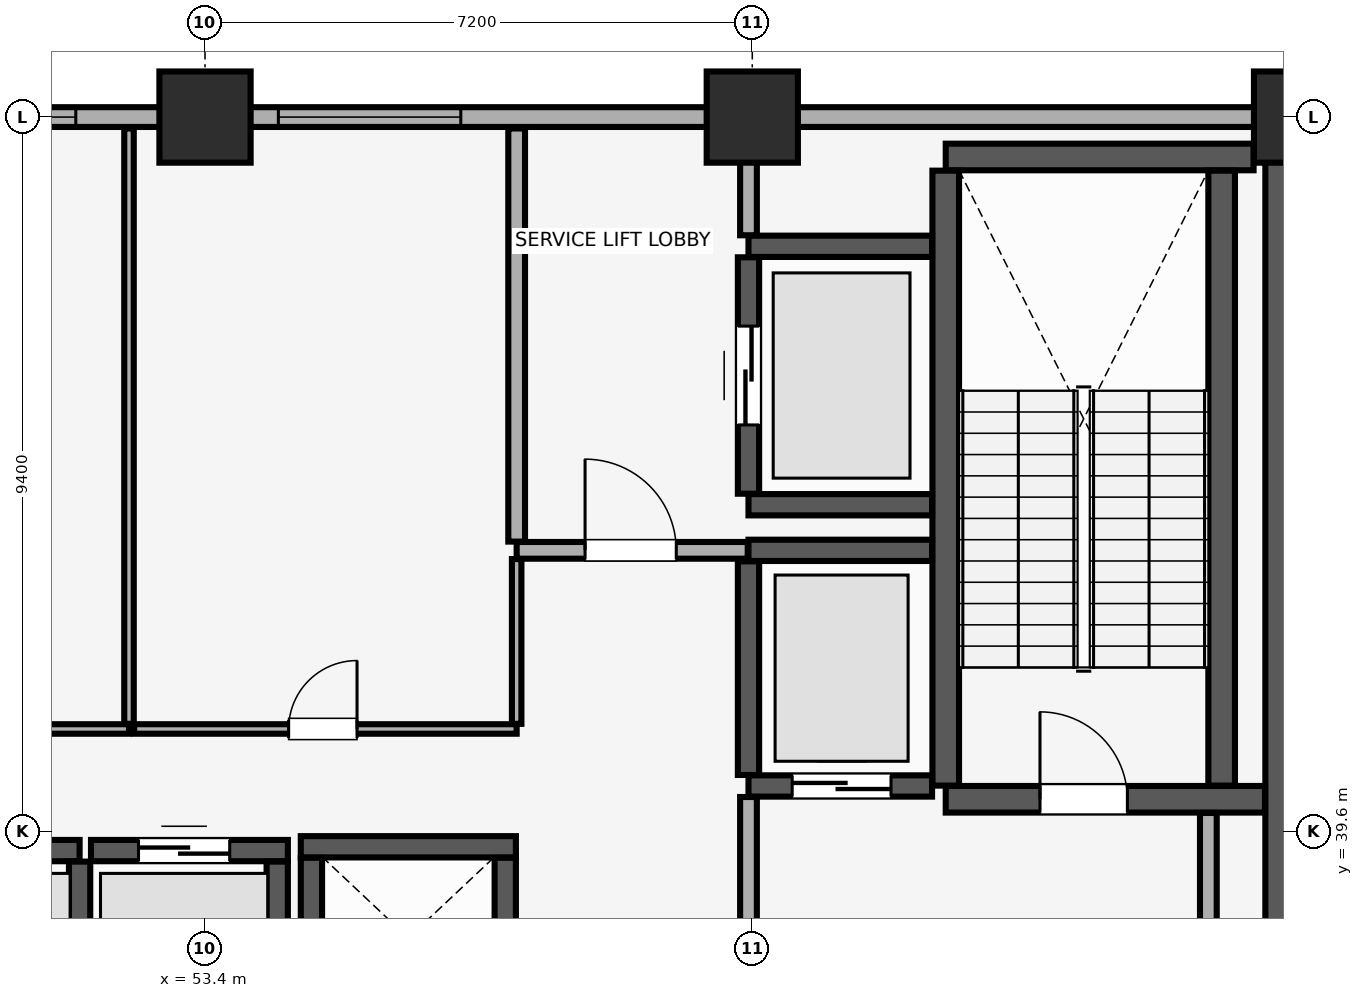
"""IFC4 building model, lengths in metres.
Left out: names, types, materials, properties, quantities, classifications, styles, units other than length and angle.
Written with IfcOpenShell. Run it as: python <this file> out.ifc"""

import sys

from ifc_helpers import new_model, si_unit, direction, frame, frame_2d, origin, origin_2d, place, context, subcontext, project, spatial, rectangle, extrude, element, fill, save


model = new_model("IFC4")
c1 = context("Model", 3, precision=1e-05, world=origin(), true_north=direction((0.0, 1.0)))
c2 = subcontext(c1, "Body", "Model", "MODEL_VIEW")
j1 = project(units=[si_unit("LENGTHUNIT", "METRE"), si_unit("PLANEANGLEUNIT", "RADIAN")], contexts=[c1])
p1 = place(None, origin())
s1 = spatial("IfcSite", under=j1, at=p1, CompositionType="ELEMENT")
p2 = place(p1, origin())
s2 = spatial("IfcBuilding", under=s1, at=p2, CompositionType="ELEMENT")
p3 = place(p2, frame((0.0, 0.0, 130.55)))
s3 = spatial("IfcBuildingStorey", under=s2, at=p3, CompositionType="ELEMENT", Elevation=130.55)
for number, where, z_axis, x_axis in (
    (1, (53.4, 49.0, 0.0), (0.0, 0.0, 1.0), (1.0, 0.0, 0.0)),
    (2, (60.6, 49.0, 0.0), (0.0, 0.0, 1.0), (1.0, 0.0, 0.0)),
    (3, (67.8, 49.0, 0.0), (0.0, 0.0, 1.0), (1.0, 0.0, 0.0)),
):
    element("IfcColumn", number, at=place(p3, frame(where, z_axis=z_axis, x_axis=x_axis)), inside=s3, PredefinedType="COLUMN", context=c2, shape_type="SweptSolid", body=[
        extrude(rectangle(XDim=1.2, YDim=1.2, at=origin_2d()), origin(), (0.0, 0.0, 1.0), 4.56),
    ])
p4 = place(p3, frame((79.8, 49.0, 0.0), z_axis=(0.0, 0.0, 1.0), x_axis=(-1.0, 0.0, 0.0)))
e4 = element("IfcWall", 4, at=p4, inside=s3, PredefinedType="SOLIDWALL", context=c2, shape_type="SweptSolid", body=[
    extrude(rectangle(XDim=75.6, YDim=0.26, at=frame_2d((37.8, 0.0))), origin(), (0.0, 0.0, 1.0), 3.4),
])
p5 = place(p4, frame((71.815, 0.0, 0.85)))
e5 = element("IfcOpeningElement", 5, at=p5, cuts=e4, PredefinedType="OPENING", context=c2, shape_type="SweptSolid", body=[
    extrude(rectangle(XDim=3.0, YDim=1.5, at=frame_2d((1.5, 0.75))), frame((0.0, 0.14, 0.0), z_axis=(0.0, -1.0, 0.0), x_axis=(1.0, 0.0, 0.0)), (0.0, 0.0, 1.0), 0.28),
])
p6 = place(p4, frame((65.775, 0.0, 0.85)))
e6 = element("IfcOpeningElement", 6, at=p6, cuts=e4, PredefinedType="OPENING", context=c2, shape_type="SweptSolid", body=[
    extrude(rectangle(XDim=3.0, YDim=1.5, at=frame_2d((1.5, 0.75))), frame((0.0, 0.14, 0.0), z_axis=(0.0, -1.0, 0.0), x_axis=(1.0, 0.0, 0.0)), (0.0, 0.0, 1.0), 0.28),
])
p7 = place(p4, frame((6.825, 0.0, 0.85)))
e7 = element("IfcOpeningElement", 7, at=p7, cuts=e4, PredefinedType="OPENING", context=c2, shape_type="SweptSolid", body=[
    extrude(rectangle(XDim=3.0, YDim=1.5, at=frame_2d((1.5, 0.75))), frame((0.0, 0.14, 0.0), z_axis=(0.0, -1.0, 0.0), x_axis=(1.0, 0.0, 0.0)), (0.0, 0.0, 1.0), 0.28),
])
p8 = place(p4, frame((0.785, 0.0, 0.85)))
e8 = element("IfcOpeningElement", 8, at=p8, cuts=e4, PredefinedType="OPENING", context=c2, shape_type="SweptSolid", body=[
    extrude(rectangle(XDim=3.0, YDim=1.5, at=frame_2d((1.5, 0.75))), frame((0.0, 0.14, 0.0), z_axis=(0.0, -1.0, 0.0), x_axis=(1.0, 0.0, 0.0)), (0.0, 0.0, 1.0), 0.28),
])
p9 = place(p4, frame((50.315, 0.0, 0.9)))
e9 = element("IfcOpeningElement", 9, at=p9, cuts=e4, PredefinedType="OPENING", context=c2, shape_type="SweptSolid", body=[
    extrude(rectangle(XDim=3.6, YDim=1.5, at=frame_2d((1.8, 0.75))), frame((0.0, 0.14, 0.0), z_axis=(0.0, -1.0, 0.0), x_axis=(1.0, 0.0, 0.0)), (0.0, 0.0, 1.0), 0.28),
])
p10 = place(p4, frame((45.25, 0.0, 0.9)))
e10 = element("IfcOpeningElement", 10, at=p10, cuts=e4, PredefinedType="OPENING", context=c2, shape_type="SweptSolid", body=[
    extrude(rectangle(XDim=3.0, YDim=1.5, at=frame_2d((1.5, 0.75))), frame((0.0, 0.14, 0.0), z_axis=(0.0, -1.0, 0.0), x_axis=(1.0, 0.0, 0.0)), (0.0, 0.0, 1.0), 0.28),
])
p11 = place(p4, frame((28.1, 0.0, 0.9)))
e11 = element("IfcOpeningElement", 11, at=p11, cuts=e4, PredefinedType="OPENING", context=c2, shape_type="SweptSolid", body=[
    extrude(rectangle(XDim=3.6, YDim=1.5, at=frame_2d((1.8, 0.75))), frame((0.0, 0.14, 0.0), z_axis=(0.0, -1.0, 0.0), x_axis=(1.0, 0.0, 0.0)), (0.0, 0.0, 1.0), 0.28),
])
p12 = place(p4, frame((23.035, 0.0, 0.9)))
e12 = element("IfcOpeningElement", 12, at=p12, cuts=e4, PredefinedType="OPENING", context=c2, shape_type="SweptSolid", body=[
    extrude(rectangle(XDim=2.4, YDim=1.5, at=frame_2d((1.2, 0.75))), frame((0.0, 0.14, 0.0), z_axis=(0.0, -1.0, 0.0), x_axis=(1.0, 0.0, 0.0)), (0.0, 0.0, 1.0), 0.28),
])
p13 = place(p3, frame((67.8, 29.4, 0.0), z_axis=(0.0, 0.0, 1.0), x_axis=(0.0, 1.0, 0.0)))
e13 = element("IfcWall", 13, at=p13, inside=s3, PredefinedType="SHEAR", context=c2, shape_type="SweptSolid", body=[
    extrude(rectangle(XDim=19.2, YDim=0.9, at=frame_2d((9.6, 0.0))), origin(), (0.0, 0.0, 1.0), 4.52),
])
p14 = place(p3, frame((63.145, 40.025, 0.0), z_axis=(0.0, 0.0, 1.0), x_axis=(1.0, 0.0, 0.0)))
e14 = element("IfcWall", 14, at=p14, inside=s3, PredefinedType="SHEAR", context=c2, shape_type="SweptSolid", body=[
    extrude(rectangle(XDim=4.2, YDim=0.35, at=frame_2d((2.1, 0.0))), origin(), (0.0, 0.0, 1.0), 4.52),
])
p15 = place(p14, frame((1.24, 0.0, 0.0)))
e15 = element("IfcOpeningElement", 15, at=p15, cuts=e14, PredefinedType="OPENING", context=c2, shape_type="SweptSolid", body=[
    extrude(rectangle(XDim=1.15, YDim=2.15, at=frame_2d((0.575, 1.075))), frame((0.0, 0.185, 0.0), z_axis=(0.0, -1.0, 0.0), x_axis=(1.0, 0.0, 0.0)), (0.0, 0.0, 1.0), 0.37),
])
p16 = place(p3, frame((63.145, 48.475, 0.0), z_axis=(0.0, 0.0, 1.0), x_axis=(1.0, 0.0, 0.0)))
e16 = element("IfcWall", 16, at=p16, inside=s3, PredefinedType="SHEAR", context=c2, shape_type="SweptSolid", body=[
    extrude(rectangle(XDim=4.05, YDim=0.35, at=frame_2d((2.025, 0.0))), origin(), (0.0, 0.0, 1.0), 4.52),
])
for number, where, z_axis, x_axis in (
    (17, (63.145, 40.205, 0.0), (0.0, 0.0, 1.0), (0.0, 1.0, 0.0)),
    (18, (66.775, 40.205, 0.0), (0.0, 0.0, 1.0), (0.0, 1.0, 0.0)),
):
    element("IfcWall", number, at=place(p3, frame(where, z_axis=z_axis, x_axis=x_axis)), inside=s3, PredefinedType="SHEAR", context=c2, shape_type="SweptSolid", body=[
        extrude(rectangle(XDim=8.09, YDim=0.35, at=frame_2d((4.045, 0.0))), origin(), (0.0, 0.0, 1.0), 4.52),
    ])
p17 = place(p3, frame((49.3, 39.35, 0.0), z_axis=(0.0, 0.0, 1.0), x_axis=(1.0, 0.0, 0.0)))
e19 = element("IfcWall", 19, at=p17, inside=s3, PredefinedType="SHEAR", context=c2, shape_type="SweptSolid", body=[
    extrude(rectangle(XDim=2.45, YDim=0.28, at=frame_2d((1.225, 0.0))), origin(), (0.0, 0.0, 1.0), 4.52),
])
p18 = place(p17, frame((0.625, 0.0, 0.0)))
e20 = element("IfcOpeningElement", 20, at=p18, cuts=e19, PredefinedType="OPENING", context=c2, shape_type="SweptSolid", body=[
    extrude(rectangle(XDim=1.2, YDim=2.25, at=frame_2d((0.6, 1.125))), frame((0.0, 0.15, 0.0), z_axis=(0.0, -1.0, 0.0), x_axis=(1.0, 0.0, 0.0)), (0.0, 0.0, 1.0), 0.3),
])
p19 = place(p3, frame((51.75, 37.145, 0.0), z_axis=(0.0, 0.0, 1.0), x_axis=(0.0, 1.0, 0.0)))
e21 = element("IfcWall", 21, at=p19, inside=s3, PredefinedType="SHEAR", context=c2, shape_type="SweptSolid", body=[
    extrude(rectangle(XDim=2.06, YDim=0.28, at=frame_2d((1.03, 0.0))), origin(), (0.0, 0.0, 1.0), 4.52),
])
p20 = place(p3, frame((51.9, 39.35, 0.0), z_axis=(0.0, 0.0, 1.0), x_axis=(1.0, 0.0, 0.0)))
e22 = element("IfcWall", 22, at=p20, inside=s3, PredefinedType="SHEAR", context=c2, shape_type="SweptSolid", body=[
    extrude(rectangle(XDim=2.59, YDim=0.28, at=frame_2d((1.295, 0.0))), origin(), (0.0, 0.0, 1.0), 4.52),
])
p21 = place(p20, frame((0.625, 0.0, 0.0)))
e23 = element("IfcOpeningElement", 23, at=p21, cuts=e22, PredefinedType="OPENING", context=c2, shape_type="SweptSolid", body=[
    extrude(rectangle(XDim=1.2, YDim=2.25, at=frame_2d((0.6, 1.125))), frame((0.0, 0.15, 0.0), z_axis=(0.0, -1.0, 0.0), x_axis=(1.0, 0.0, 0.0)), (0.0, 0.0, 1.0), 0.3),
])
p22 = place(p3, frame((54.35, 37.145, 0.0), z_axis=(0.0, 0.0, 1.0), x_axis=(0.0, 1.0, 0.0)))
e24 = element("IfcWall", 24, at=p22, inside=s3, PredefinedType="SHEAR", context=c2, shape_type="SweptSolid", body=[
    extrude(rectangle(XDim=2.06, YDim=0.28, at=frame_2d((1.03, 0.0))), origin(), (0.0, 0.0, 1.0), 4.52),
])
p23 = place(p3, frame((54.66, 39.4, 0.0), z_axis=(0.0, 0.0, 1.0), x_axis=(1.0, 0.0, 0.0)))
e25 = element("IfcWall", 25, at=p23, inside=s3, PredefinedType="SHEAR", context=c2, shape_type="SweptSolid", body=[
    extrude(rectangle(XDim=2.83, YDim=0.28, at=frame_2d((1.415, 0.0))), origin(), (0.0, 0.0, 1.0), 4.52),
])
for number, where, z_axis, x_axis in (
    (26, (54.8, 37.145, 0.0), (0.0, 0.0, 1.0), (0.0, 1.0, 0.0)),
    (27, (57.35, 37.145, 0.0), (0.0, 0.0, 1.0), (0.0, 1.0, 0.0)),
):
    element("IfcWall", number, at=place(p3, frame(where, z_axis=z_axis, x_axis=x_axis)), inside=s3, PredefinedType="SHEAR", context=c2, shape_type="SweptSolid", body=[
        extrude(rectangle(XDim=2.11, YDim=0.28, at=frame_2d((1.055, 0.0))), origin(), (0.0, 0.0, 1.0), 4.52),
    ])
p24 = place(p3, frame((60.55, 40.2, 0.0), z_axis=(0.0, 0.0, 1.0), x_axis=(1.0, 0.0, 0.0)))
e28 = element("IfcWall", 28, at=p24, inside=s3, PredefinedType="SHEAR", context=c2, shape_type="SweptSolid", body=[
    extrude(rectangle(XDim=2.415, YDim=0.28, at=frame_2d((1.208, 0.0))), origin(), (0.0, 0.0, 1.0), 4.52),
])
p25 = place(p24, frame((0.575, 0.0, 0.0)))
e29 = element("IfcOpeningElement", 29, at=p25, cuts=e28, PredefinedType="OPENING", context=c2, shape_type="SweptSolid", body=[
    extrude(rectangle(XDim=1.3, YDim=2.3, at=frame_2d((0.65, 1.15))), frame((0.0, 0.15, 0.0), z_axis=(0.0, -1.0, 0.0), x_axis=(1.0, 0.0, 0.0)), (0.0, 0.0, 1.0), 0.3),
])
p26 = place(p3, frame((60.55, 43.3, 0.0), z_axis=(0.0, 0.0, 1.0), x_axis=(1.0, 0.0, 0.0)))
e30 = element("IfcWall", 30, at=p26, inside=s3, PredefinedType="SHEAR", context=c2, shape_type="SweptSolid", body=[
    extrude(rectangle(XDim=2.415, YDim=0.28, at=frame_2d((1.208, 0.0))), origin(), (0.0, 0.0, 1.0), 4.52),
])
p27 = place(p3, frame((60.55, 40.345, 0.0), z_axis=(0.0, 0.0, 1.0), x_axis=(0.0, 1.0, 0.0)))
e31 = element("IfcWall", 31, at=p27, inside=s3, PredefinedType="SHEAR", context=c2, shape_type="SweptSolid", body=[
    extrude(rectangle(XDim=2.81, YDim=0.28, at=frame_2d((1.405, 0.0))), origin(), (0.0, 0.0, 1.0), 4.52),
])
for number, where, z_axis, x_axis in (
    (32, (60.55, 43.9, 0.0), (0.0, 0.0, 1.0), (1.0, 0.0, 0.0)),
    (33, (60.55, 47.3, 0.0), (0.0, 0.0, 1.0), (1.0, 0.0, 0.0)),
):
    element("IfcWall", number, at=place(p3, frame(where, z_axis=z_axis, x_axis=x_axis)), inside=s3, PredefinedType="SHEAR", context=c2, shape_type="SweptSolid", body=[
        extrude(rectangle(XDim=2.415, YDim=0.28, at=frame_2d((1.208, 0.0))), origin(), (0.0, 0.0, 1.0), 4.52),
    ])
p28 = place(p3, frame((60.55, 44.045, 0.0), z_axis=(0.0, 0.0, 1.0), x_axis=(0.0, 1.0, 0.0)))
e34 = element("IfcWall", 34, at=p28, inside=s3, PredefinedType="SHEAR", context=c2, shape_type="SweptSolid", body=[
    extrude(rectangle(XDim=3.11, YDim=0.28, at=frame_2d((1.555, 0.0))), origin(), (0.0, 0.0, 1.0), 4.52),
])
p29 = place(p28, frame((0.905, 0.0, 0.0)))
e35 = element("IfcOpeningElement", 35, at=p29, cuts=e34, PredefinedType="OPENING", context=c2, shape_type="SweptSolid", body=[
    extrude(rectangle(XDim=1.3, YDim=2.3, at=frame_2d((0.65, 1.15))), frame((0.0, 0.15, 0.0), z_axis=(0.0, -1.0, 0.0), x_axis=(1.0, 0.0, 0.0)), (0.0, 0.0, 1.0), 0.3),
])
p30 = place(p3, frame((60.55, 34.415, 0.0), z_axis=(0.0, 0.0, 1.0), x_axis=(0.0, 1.0, 0.0)))
e36 = element("IfcWall", 36, at=p30, inside=s3, PredefinedType="PARTITIONING", context=c2, shape_type="SweptSolid", body=[
    extrude(rectangle(XDim=5.64, YDim=0.22, at=frame_2d((2.82, 0.0))), origin(), (0.0, 0.0, 1.0), 4.52),
])
p31 = place(p3, frame((66.6, 34.415, 0.0), z_axis=(0.0, 0.0, 1.0), x_axis=(0.0, 1.0, 0.0)))
e37 = element("IfcWall", 37, at=p31, inside=s3, PredefinedType="PARTITIONING", context=c2, shape_type="SweptSolid", body=[
    extrude(rectangle(XDim=5.43, YDim=0.22, at=frame_2d((2.715, 0.0))), origin(), (0.0, 0.0, 1.0), 4.52),
])
p32 = place(p3, frame((57.5, 43.3, 0.0), z_axis=(0.0, 0.0, 1.0), x_axis=(1.0, 0.0, 0.0)))
e38 = element("IfcWall", 38, at=p32, inside=s3, PredefinedType="PARTITIONING", context=c2, shape_type="SweptSolid", body=[
    extrude(rectangle(XDim=3.04, YDim=0.22, at=frame_2d((1.52, 0.0))), origin(), (0.0, 0.0, 1.0), 4.52),
])
p33 = place(p32, frame((0.9, 0.0, 0.0)))
e39 = element("IfcOpeningElement", 39, at=p33, cuts=e38, PredefinedType="OPENING", context=c2, shape_type="SweptSolid", body=[
    extrude(rectangle(XDim=1.2, YDim=2.15, at=frame_2d((0.6, 1.075))), frame((0.0, 0.12, 0.0), z_axis=(0.0, -1.0, 0.0), x_axis=(1.0, 0.0, 0.0)), (0.0, 0.0, 1.0), 0.24),
])
p34 = place(p3, frame((57.5, 43.415, 0.0), z_axis=(0.0, 0.0, 1.0), x_axis=(0.0, 1.0, 0.0)))
e40 = element("IfcWall", 40, at=p34, inside=s3, PredefinedType="PARTITIONING", context=c2, shape_type="SweptSolid", body=[
    extrude(rectangle(XDim=5.435, YDim=0.22, at=frame_2d((2.718, 0.0))), origin(), (0.0, 0.0, 1.0), 4.52),
])
p35 = place(p3, frame((60.55, 47.445, 0.0), z_axis=(0.0, 0.0, 1.0), x_axis=(0.0, 1.0, 0.0)))
e41 = element("IfcWall", 41, at=p35, inside=s3, PredefinedType="PARTITIONING", context=c2, shape_type="SweptSolid", body=[
    extrude(rectangle(XDim=1.405, YDim=0.22, at=frame_2d((0.703, 0.0))), origin(), (0.0, 0.0, 1.0), 4.52),
])
p36 = place(p3, frame((47.468, 40.95, 0.0), z_axis=(0.0, 0.0, 1.0), x_axis=(1.0, 0.0, 0.0)))
e42 = element("IfcWall", 42, at=p36, inside=s3, PredefinedType="PARTITIONING", context=c2, shape_type="SweptSolid", body=[
    extrude(rectangle(XDim=4.932, YDim=0.125, at=frame_2d((2.466, 0.0))), origin(), (0.0, 0.0, 1.0), 4.52),
])
p37 = place(p36, frame((1.982, 0.0, 0.0)))
e43 = element("IfcOpeningElement", 43, at=p37, cuts=e42, PredefinedType="OPENING", context=c2, shape_type="SweptSolid", body=[
    extrude(rectangle(XDim=0.9, YDim=2.1, at=frame_2d((0.45, 1.05))), frame((0.0, 0.073, 0.0), z_axis=(0.0, -1.0, 0.0), x_axis=(1.0, 0.0, 0.0)), (0.0, 0.0, 1.0), 0.145),
])
p38 = place(p3, frame((52.4, 41.018, 0.0), z_axis=(0.0, 0.0, 1.0), x_axis=(0.0, 1.0, 0.0)))
e44 = element("IfcWall", 44, at=p38, inside=s3, PredefinedType="PARTITIONING", context=c2, shape_type="SweptSolid", body=[
    extrude(rectangle(XDim=7.833, YDim=0.125, at=frame_2d((3.916, 0.0))), origin(), (0.0, 0.0, 1.0), 4.52),
])
p39 = place(p3, frame((52.468, 40.95, 0.0), z_axis=(0.0, 0.0, 1.0), x_axis=(1.0, 0.0, 0.0)))
e45 = element("IfcWall", 45, at=p39, inside=s3, PredefinedType="PARTITIONING", context=c2, shape_type="SweptSolid", body=[
    extrude(rectangle(XDim=5.032, YDim=0.125, at=frame_2d((2.516, 0.0))), origin(), (0.0, 0.0, 1.0), 4.52),
])
p40 = place(p39, frame((2.032, 0.0, 0.0)))
e46 = element("IfcOpeningElement", 46, at=p40, cuts=e45, PredefinedType="OPENING", context=c2, shape_type="SweptSolid", body=[
    extrude(rectangle(XDim=0.9, YDim=2.1, at=frame_2d((0.45, 1.05))), frame((0.0, 0.073, 0.0), z_axis=(0.0, -1.0, 0.0), x_axis=(1.0, 0.0, 0.0)), (0.0, 0.0, 1.0), 0.145),
])
p41 = place(p3, frame((57.5, 41.018, 0.0), z_axis=(0.0, 0.0, 1.0), x_axis=(0.0, 1.0, 0.0)))
e47 = element("IfcWall", 47, at=p41, inside=s3, PredefinedType="PARTITIONING", context=c2, shape_type="SweptSolid", body=[
    extrude(rectangle(XDim=2.167, YDim=0.125, at=frame_2d((1.084, 0.0))), origin(), (0.0, 0.0, 1.0), 4.52),
])
p42 = place(p11, origin())
e48 = element("IfcWindow", 48, at=p42, inside=s3, PartitioningType="SINGLE_PANEL", PredefinedType="WINDOW", context=c2, shape_type="SweptSolid", body=[
    extrude(rectangle(XDim=3.6, YDim=1.5, at=frame_2d((1.8, 0.75))), frame((0.0, 0.03, 0.0), z_axis=(0.0, -1.0, 0.0), x_axis=(1.0, 0.0, 0.0)), (0.0, 0.0, 1.0), 0.06),
])
fill(e11, e48)
p43 = place(p12, origin())
e49 = element("IfcWindow", 49, at=p43, inside=s3, PartitioningType="SINGLE_PANEL", PredefinedType="WINDOW", context=c2, shape_type="SweptSolid", body=[
    extrude(rectangle(XDim=2.4, YDim=1.5, at=frame_2d((1.2, 0.75))), frame((0.0, 0.03, 0.0), z_axis=(0.0, -1.0, 0.0), x_axis=(1.0, 0.0, 0.0)), (0.0, 0.0, 1.0), 0.06),
])
fill(e12, e49)
p44 = place(p15, origin())
e50 = element("IfcDoor", 50, at=p44, inside=s3, OperationType="SINGLE_SWING_LEFT", PredefinedType="DOOR", context=c2, shape_type="SweptSolid", body=[
    extrude(rectangle(XDim=1.15, YDim=2.15, at=frame_2d((0.575, 1.075))), frame((0.0, 0.025, 0.0), z_axis=(0.0, -1.0, 0.0), x_axis=(1.0, 0.0, 0.0)), (0.0, 0.0, 1.0), 0.05),
])
fill(e15, e50)
p45 = place(p21, origin())
e51 = element("IfcDoor", 51, at=p45, inside=s3, OperationType="DOUBLE_DOOR_SLIDING", PredefinedType="DOOR", context=c2, shape_type="SweptSolid", body=[
    extrude(rectangle(XDim=1.2, YDim=2.25, at=frame_2d((0.6, 1.125))), frame((0.0, 0.025, 0.0), z_axis=(0.0, -1.0, 0.0), x_axis=(1.0, 0.0, 0.0)), (0.0, 0.0, 1.0), 0.05),
])
fill(e23, e51)
p46 = place(p25, origin())
e52 = element("IfcDoor", 52, at=p46, inside=s3, OperationType="DOUBLE_DOOR_SLIDING", PredefinedType="DOOR", context=c2, shape_type="SweptSolid", body=[
    extrude(rectangle(XDim=1.3, YDim=2.3, at=frame_2d((0.65, 1.15))), frame((0.0, 0.025, 0.0), z_axis=(0.0, -1.0, 0.0), x_axis=(1.0, 0.0, 0.0)), (0.0, 0.0, 1.0), 0.05),
])
fill(e29, e52)
p47 = place(p29, origin())
e53 = element("IfcDoor", 53, at=p47, inside=s3, OperationType="DOUBLE_DOOR_SLIDING", PredefinedType="DOOR", context=c2, shape_type="SweptSolid", body=[
    extrude(rectangle(XDim=1.3, YDim=2.3, at=frame_2d((0.65, 1.15))), frame((0.0, 0.025, 0.0), z_axis=(0.0, -1.0, 0.0), x_axis=(1.0, 0.0, 0.0)), (0.0, 0.0, 1.0), 0.05),
])
fill(e35, e53)
p48 = place(p33, origin())
e54 = element("IfcDoor", 54, at=p48, inside=s3, OperationType="SINGLE_SWING_LEFT", PredefinedType="DOOR", context=c2, shape_type="SweptSolid", body=[
    extrude(rectangle(XDim=1.2, YDim=2.15, at=frame_2d((0.6, 1.075))), frame((0.0, 0.025, 0.0), z_axis=(0.0, -1.0, 0.0), x_axis=(1.0, 0.0, 0.0)), (0.0, 0.0, 1.0), 0.05),
])
fill(e39, e54)
p49 = place(p40, origin())
e55 = element("IfcDoor", 55, at=p49, inside=s3, OperationType="SINGLE_SWING_RIGHT", PredefinedType="DOOR", context=c2, shape_type="SweptSolid", body=[
    extrude(rectangle(XDim=0.9, YDim=2.1, at=frame_2d((0.45, 1.05))), frame((0.0, 0.025, 0.0), z_axis=(0.0, -1.0, 0.0), x_axis=(1.0, 0.0, 0.0)), (0.0, 0.0, 1.0), 0.05),
])
fill(e46, e55)
save(model, sys.argv[1])
